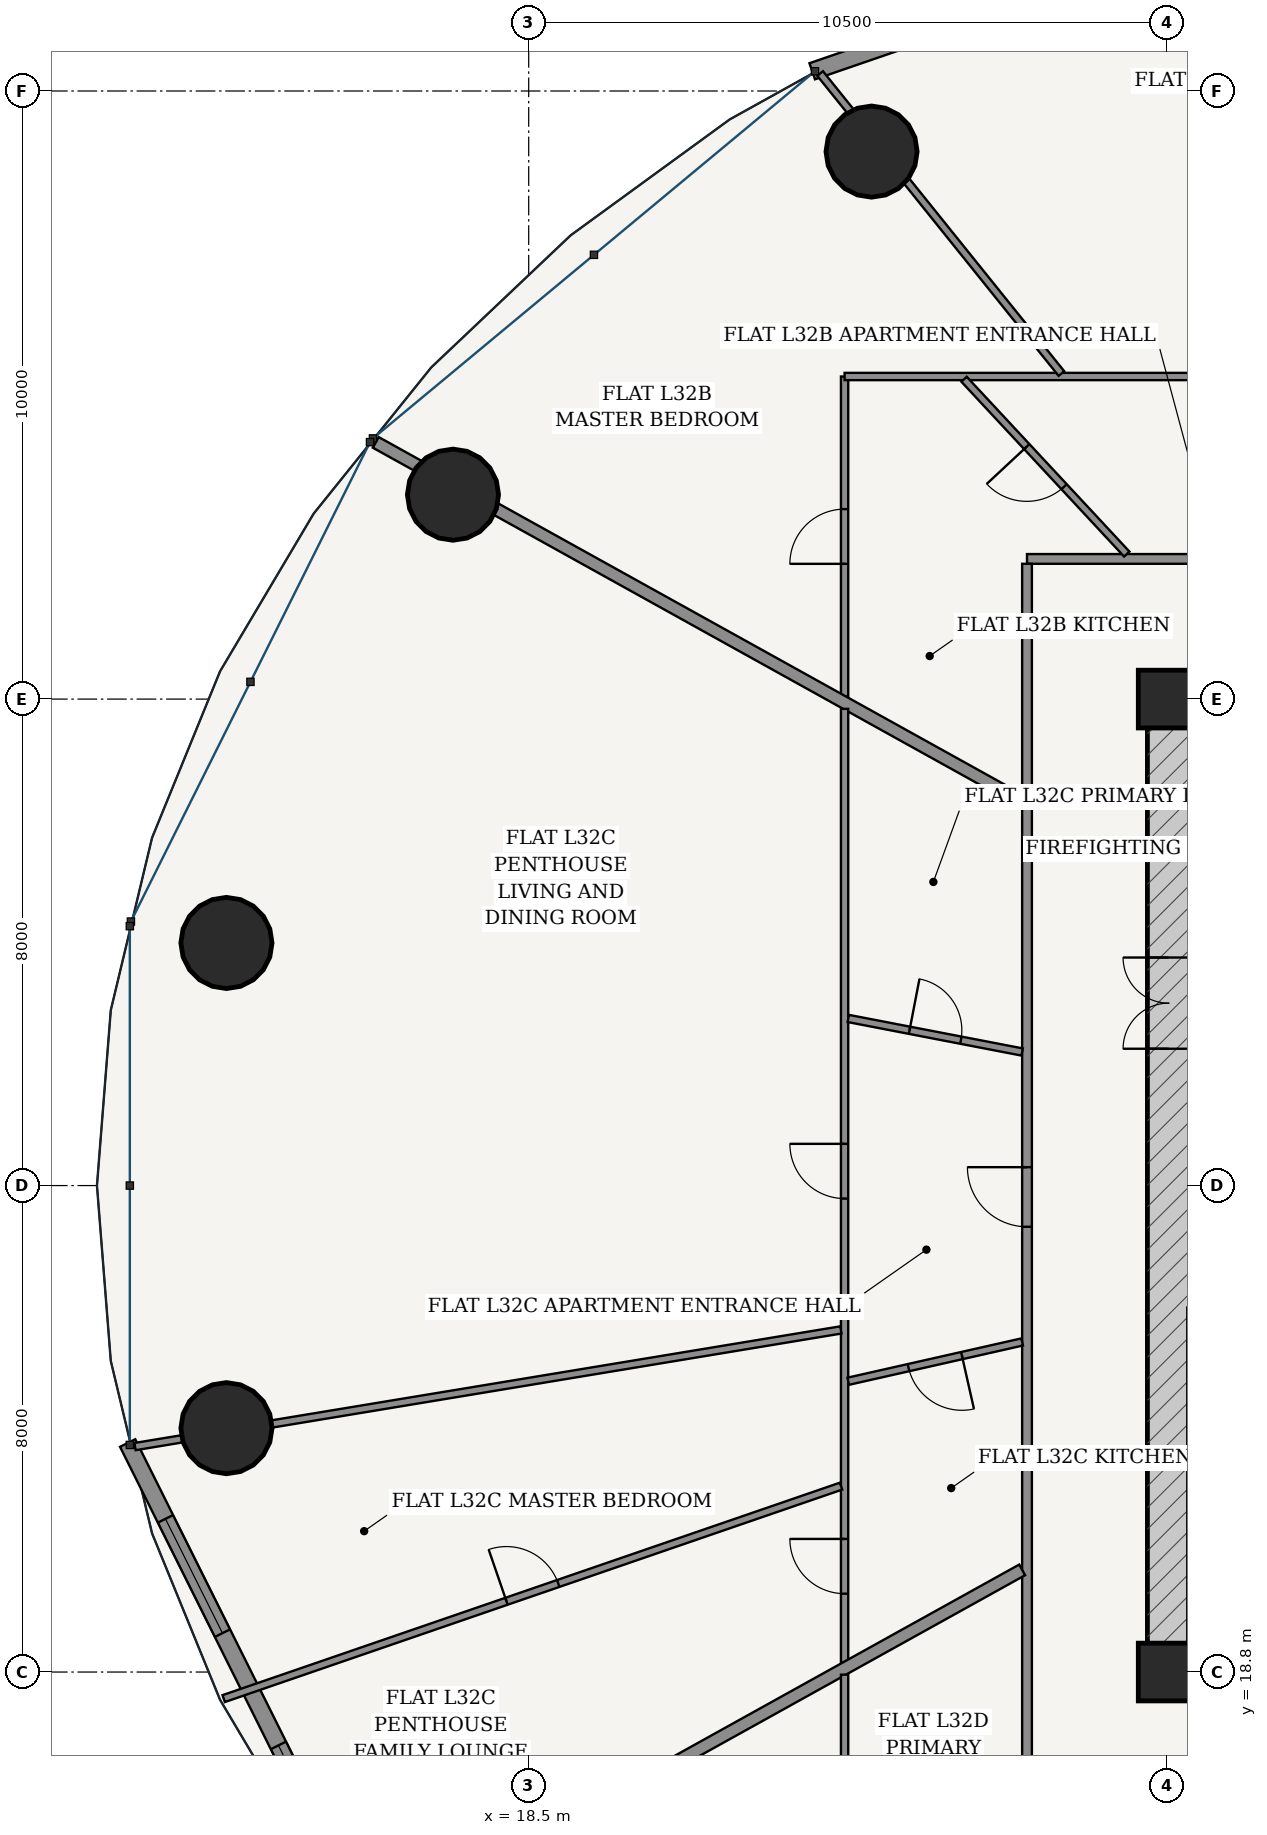
"""IFC4 building model, lengths in metres.
Left out: names, types, materials, properties, quantities, classifications, styles, units other than length and angle.
Written with IfcOpenShell. Run it as: python <this file> out.ifc"""

import sys

from ifc_helpers import new_model, si_unit, direction, frame, frame_2d, origin, origin_2d, place, context, subcontext, project, spatial, rectangle, hollow_circle, extrude, source, transform, mapped, element, fill, save


model = new_model("IFC4")
c1 = context("Model", 3, precision=1e-05, world=origin(), true_north=direction((-0.2419218956, 0.970295726276)))
c2 = subcontext(c1, "Body", "Model", "MODEL_VIEW")
j1 = project(units=[si_unit("LENGTHUNIT", "METRE"), si_unit("PLANEANGLEUNIT", "RADIAN")], contexts=[c1])
p1 = place(None, origin())
s1 = spatial("IfcSite", under=j1, at=p1, CompositionType="ELEMENT")
p2 = place(p1, origin())
s2 = spatial("IfcBuilding", under=s1, at=p2, CompositionType="ELEMENT")
p3 = place(p2, frame((0.0, 0.0, 123.0)))
s3 = spatial("IfcBuildingStorey", under=s2, at=p3, CompositionType="ELEMENT", Elevation=123.0)
for number, where, z_axis, x_axis in (
    (1, (29.0, 18.8, 0.0), (0.0, 0.0, 1.0), (1.0, 0.0, 0.0)),
    (2, (29.0, 34.8, 0.0), (0.0, 0.0, 1.0), (1.0, 0.0, 0.0)),
):
    element("IfcColumn", number, at=place(p3, frame(where, z_axis=z_axis, x_axis=x_axis)), inside=s3, PredefinedType="COLUMN", context=c2, shape_type="SweptSolid", body=[
        extrude(rectangle(XDim=0.95, YDim=0.95, at=origin_2d()), origin(), (0.0, 0.0, 1.0), 3.6),
    ])
p4 = place(p3, frame((28.675, 18.825, 0.0), z_axis=(0.0, 0.0, 1.0), x_axis=(1.0, 0.0, 0.0)))
e3 = element("IfcWall", 3, at=p4, inside=s3, PredefinedType="SHEAR", context=c2, shape_type="SweptSolid", body=[
    extrude(rectangle(XDim=18.65, YDim=0.7, at=frame_2d((9.325, 0.0))), origin(), (0.0, 0.0, 1.0), 3.325),
])
p5 = place(p4, frame((8.9, 0.0, 0.0)))
e4 = element("IfcOpeningElement", 4, at=p5, cuts=e3, PredefinedType="OPENING", context=c2, shape_type="SweptSolid", body=[
    extrude(rectangle(XDim=0.85, YDim=2.1, at=frame_2d((0.425, 1.05))), frame((0.0, 0.36, 0.0), z_axis=(0.0, -1.0, 0.0), x_axis=(1.0, 0.0, 0.0)), (0.0, 0.0, 1.0), 0.72),
])
p6 = place(p3, frame((28.675, 34.775, 0.0), z_axis=(0.0, 0.0, 1.0), x_axis=(1.0, 0.0, 0.0)))
e5 = element("IfcWall", 5, at=p6, inside=s3, PredefinedType="SHEAR", context=c2, shape_type="SweptSolid", body=[
    extrude(rectangle(XDim=18.65, YDim=0.7, at=frame_2d((9.325, 0.0))), origin(), (0.0, 0.0, 1.0), 3.325),
])
p7 = place(p6, frame((8.9, 0.0, 0.0)))
e6 = element("IfcOpeningElement", 6, at=p7, cuts=e5, PredefinedType="OPENING", context=c2, shape_type="SweptSolid", body=[
    extrude(rectangle(XDim=0.85, YDim=2.1, at=frame_2d((0.425, 1.05))), frame((0.0, 0.36, 0.0), z_axis=(0.0, -1.0, 0.0), x_axis=(1.0, 0.0, 0.0)), (0.0, 0.0, 1.0), 0.72),
])
p8 = place(p3, frame((29.025, 19.175, 0.0), z_axis=(0.0, 0.0, 1.0), x_axis=(0.0, 1.0, 0.0)))
e7 = element("IfcWall", 7, at=p8, inside=s3, PredefinedType="SHEAR", context=c2, shape_type="SweptSolid", body=[
    extrude(rectangle(XDim=15.25, YDim=0.7, at=frame_2d((7.625, 0.0))), origin(), (0.0, 0.0, 1.0), 3.325),
])
p9 = place(p8, frame((9.875, 0.0, 0.0)))
e8 = element("IfcOpeningElement", 8, at=p9, cuts=e7, PredefinedType="OPENING", context=c2, shape_type="SweptSolid", body=[
    extrude(rectangle(XDim=1.5, YDim=2.2, at=frame_2d((0.75, 1.1))), frame((0.0, 0.36, 0.0), z_axis=(0.0, -1.0, 0.0), x_axis=(1.0, 0.0, 0.0)), (0.0, 0.0, 1.0), 0.72),
])
for number, where, z_axis, x_axis in (
    (9, (24.138, 43.803, 0.0), (0.0, 0.0, 1.0), (1.0, 0.0, 0.0)),
    (10, (17.255, 38.161, 0.0), (0.0, 0.0, 1.0), (1.0, 0.0, 0.0)),
    (11, (13.529, 30.79, 0.0), (0.0, 0.0, 1.0), (1.0, 0.0, 0.0)),
    (12, (13.529, 22.81, 0.0), (0.0, 0.0, 1.0), (1.0, 0.0, 0.0)),
):
    element("IfcColumn", number, at=place(p3, frame(where, z_axis=z_axis, x_axis=x_axis)), inside=s3, PredefinedType="COLUMN", context=c2, shape_type="SweptSolid", body=[
        extrude(hollow_circle(Radius=0.75, WallThickness=0.045, at=origin_2d()), origin(), (0.0, 0.0, 1.0), 3.6),
    ])
p10 = place(p3, frame((32.892, 48.472, 0.0), z_axis=(0.0, 0.0, 1.0), x_axis=(-0.945597432299, -0.325339047809, 0.0)))
e13 = element("IfcWall", 13, at=p10, inside=s3, PredefinedType="SOLIDWALL", context=c2, shape_type="SweptSolid", body=[
    extrude(rectangle(XDim=10.289, YDim=0.28, at=frame_2d((5.145, 0.0))), origin(), (0.0, 0.0, 1.0), 3.325),
])
p11 = place(p10, frame((1.728, 0.0, 0.85)))
e14 = element("IfcOpeningElement", 14, at=p11, cuts=e13, PredefinedType="OPENING", context=c2, shape_type="SweptSolid", body=[
    extrude(rectangle(XDim=2.1, YDim=1.95, at=frame_2d((1.05, 0.975))), frame((0.0, 0.15, 0.0), z_axis=(0.0, -1.0, 0.0), x_axis=(1.0, 0.0, 0.0)), (0.0, 0.0, 1.0), 0.3),
])
p12 = place(p10, frame((6.461, 0.0, 0.85)))
e15 = element("IfcOpeningElement", 15, at=p12, cuts=e13, PredefinedType="OPENING", context=c2, shape_type="SweptSolid", body=[
    extrude(rectangle(XDim=2.1, YDim=1.95, at=frame_2d((1.05, 0.975))), frame((0.0, 0.15, 0.0), z_axis=(0.0, -1.0, 0.0), x_axis=(1.0, 0.0, 0.0)), (0.0, 0.0, 1.0), 0.3),
])
p13 = place(p3, frame((11.905, 22.566, 0.0), z_axis=(0.0, 0.0, 1.0), x_axis=(0.446274562077, -0.894896091869, 0.0)))
e16 = element("IfcWall", 16, at=p13, inside=s3, PredefinedType="SOLIDWALL", context=c2, shape_type="SweptSolid", body=[
    extrude(rectangle(XDim=9.05, YDim=0.28, at=frame_2d((4.525, 0.0))), origin(), (0.0, 0.0, 1.0), 3.325),
])
p14 = place(p13, frame((1.394, 0.0, 0.85)))
e17 = element("IfcOpeningElement", 17, at=p14, cuts=e16, PredefinedType="OPENING", context=c2, shape_type="SweptSolid", body=[
    extrude(rectangle(XDim=2.1, YDim=1.95, at=frame_2d((1.05, 0.975))), frame((0.0, 0.15, 0.0), z_axis=(0.0, -1.0, 0.0), x_axis=(1.0, 0.0, 0.0)), (0.0, 0.0, 1.0), 0.3),
])
p15 = place(p13, frame((5.557, 0.0, 0.85)))
e18 = element("IfcOpeningElement", 18, at=p15, cuts=e16, PredefinedType="OPENING", context=c2, shape_type="SweptSolid", body=[
    extrude(rectangle(XDim=2.1, YDim=1.95, at=frame_2d((1.05, 0.975))), frame((0.0, 0.15, 0.0), z_axis=(0.0, -1.0, 0.0), x_axis=(1.0, 0.0, 0.0)), (0.0, 0.0, 1.0), 0.3),
])
p16 = place(p3, frame((26.695, 37.105, 0.0), z_axis=(0.0, 0.0, 1.0), x_axis=(1.0, 0.0, 0.0)))
e19 = element("IfcWall", 19, at=p16, inside=s3, PredefinedType="PARTITIONING", context=c2, shape_type="SweptSolid", body=[
    extrude(rectangle(XDim=22.61, YDim=0.16, at=frame_2d((11.305, 0.0))), origin(), (0.0, 0.0, 1.0), 2.767),
])
p17 = place(p16, frame((4.925, 0.0, 0.0)))
e20 = element("IfcOpeningElement", 20, at=p17, cuts=e19, PredefinedType="OPENING", context=c2, shape_type="SweptSolid", body=[
    extrude(rectangle(XDim=0.98, YDim=2.2, at=frame_2d((0.49, 1.1))), frame((0.0, 0.09, 0.0), z_axis=(0.0, -1.0, 0.0), x_axis=(1.0, 0.0, 0.0)), (0.0, 0.0, 1.0), 0.18),
])
p18 = place(p3, frame((26.695, 16.575, 0.0), z_axis=(0.0, 0.0, 1.0), x_axis=(0.0, 1.0, 0.0)))
e21 = element("IfcWall", 21, at=p18, inside=s3, PredefinedType="PARTITIONING", context=c2, shape_type="SweptSolid", body=[
    extrude(rectangle(XDim=20.45, YDim=0.16, at=frame_2d((10.225, 0.0))), origin(), (0.0, 0.0, 1.0), 2.767),
])
p19 = place(p18, frame((9.547, 0.0, 0.0)))
e22 = element("IfcOpeningElement", 22, at=p19, cuts=e21, PredefinedType="OPENING", context=c2, shape_type="SweptSolid", body=[
    extrude(rectangle(XDim=0.98, YDim=2.2, at=frame_2d((0.49, 1.1))), frame((0.0, 0.09, 0.0), z_axis=(0.0, -1.0, 0.0), x_axis=(1.0, 0.0, 0.0)), (0.0, 0.0, 1.0), 0.18),
])
p20 = place(p3, frame((23.695, 34.843, 0.0), z_axis=(0.0, 0.0, 1.0), x_axis=(0.0, 1.0, 0.0)))
e23 = element("IfcWall", 23, at=p20, inside=s3, PredefinedType="PARTITIONING", context=c2, shape_type="SweptSolid", body=[
    extrude(rectangle(XDim=5.262, YDim=0.12, at=frame_2d((2.631, 0.0))), origin(), (0.0, 0.0, 1.0), 3.004),
])
p21 = place(p20, frame((2.181, 0.0, 0.0)))
e24 = element("IfcOpeningElement", 24, at=p21, cuts=e23, PredefinedType="OPENING", context=c2, shape_type="SweptSolid", body=[
    extrude(rectangle(XDim=0.9, YDim=2.15, at=frame_2d((0.45, 1.075))), frame((0.0, 0.07, 0.0), z_axis=(0.0, -1.0, 0.0), x_axis=(1.0, 0.0, 0.0)), (0.0, 0.0, 1.0), 0.14),
])
p22 = place(p3, frame((23.695, 40.105, 0.0), z_axis=(0.0, 0.0, 1.0), x_axis=(1.0, 0.0, 0.0)))
e25 = element("IfcWall", 25, at=p22, inside=s3, PredefinedType="PARTITIONING", context=c2, shape_type="SweptSolid", body=[
    extrude(rectangle(XDim=17.388, YDim=0.12, at=frame_2d((8.694, 0.0))), origin(), (0.0, 0.0, 1.0), 2.767),
])
p23 = place(p22, frame((7.184, 0.0, 0.0)))
e26 = element("IfcOpeningElement", 26, at=p23, cuts=e25, PredefinedType="OPENING", context=c2, shape_type="SweptSolid", body=[
    extrude(rectangle(XDim=0.9, YDim=2.15, at=frame_2d((0.45, 1.075))), frame((0.0, 0.07, 0.0), z_axis=(0.0, -1.0, 0.0), x_axis=(1.0, 0.0, 0.0)), (0.0, 0.0, 1.0), 0.14),
])
p24 = place(p3, frame((27.261, 40.153, 0.0), z_axis=(0.0, 0.0, 1.0), x_axis=(-0.626714875168, 0.779248654309, 0.0)))
e27 = element("IfcWall", 27, at=p24, inside=s3, PredefinedType="PARTITIONING", context=c2, shape_type="SweptSolid", body=[
    extrude(rectangle(XDim=6.332, YDim=0.12, at=frame_2d((3.166, 0.0))), origin(), (0.0, 0.0, 1.0), 2.767),
])
p25 = place(p3, frame((28.335, 37.185, 0.0), z_axis=(0.0, 0.0, 1.0), x_axis=(-0.681251984121, 0.732048997083, 0.0)))
e28 = element("IfcWall", 28, at=p25, inside=s3, PredefinedType="PARTITIONING", context=c2, shape_type="SweptSolid", body=[
    extrude(rectangle(XDim=3.927, YDim=0.12, at=frame_2d((1.963, 0.0))), origin(), (0.0, 0.0, 1.0), 2.767),
])
p26 = place(p25, frame((1.513, 0.0, 0.0)))
e29 = element("IfcOpeningElement", 29, at=p26, cuts=e28, PredefinedType="OPENING", context=c2, shape_type="SweptSolid", body=[
    extrude(rectangle(XDim=0.9, YDim=2.15, at=frame_2d((0.45, 1.075))), frame((0.0, 0.07, 0.0), z_axis=(0.0, -1.0, 0.0), x_axis=(1.0, 0.0, 0.0)), (0.0, 0.0, 1.0), 0.14),
])
p27 = place(p3, frame((26.615, 33.12, 0.0), z_axis=(0.0, 0.0, 1.0), x_axis=(-0.874319192772, 0.485351366692, 0.0)))
e30 = element("IfcWall", 30, at=p27, inside=s3, PredefinedType="PARTITIONING", context=c2, shape_type="SweptSolid", body=[
    extrude(rectangle(XDim=12.158, YDim=0.2, at=frame_2d((6.079, 0.0))), origin(), (0.0, 0.0, 1.0), 2.767),
])
p28 = place(p3, frame((23.695, 18.961, 0.0), z_axis=(0.0, 0.0, 1.0), x_axis=(0.0, 1.0, 0.0)))
e31 = element("IfcWall", 31, at=p28, inside=s3, PredefinedType="PARTITIONING", context=c2, shape_type="SweptSolid", body=[
    extrude(rectangle(XDim=15.679, YDim=0.12, at=frame_2d((7.839, 0.0))), origin(), (0.0, 0.0, 1.0), 2.767),
])
p29 = place(p28, frame((7.625, 0.0, 0.0)))
e32 = element("IfcOpeningElement", 32, at=p29, cuts=e31, PredefinedType="OPENING", context=c2, shape_type="SweptSolid", body=[
    extrude(rectangle(XDim=0.9, YDim=2.15, at=frame_2d((0.45, 1.075))), frame((0.0, 0.07, 0.0), z_axis=(0.0, -1.0, 0.0), x_axis=(1.0, 0.0, 0.0)), (0.0, 0.0, 1.0), 0.14),
])
p30 = place(p28, frame((1.128, 0.0, 0.0)))
e33 = element("IfcOpeningElement", 33, at=p30, cuts=e31, PredefinedType="OPENING", context=c2, shape_type="SweptSolid", body=[
    extrude(rectangle(XDim=0.9, YDim=2.15, at=frame_2d((0.45, 1.075))), frame((0.0, 0.07, 0.0), z_axis=(0.0, -1.0, 0.0), x_axis=(1.0, 0.0, 0.0)), (0.0, 0.0, 1.0), 0.14),
])
p31 = place(p3, frame((23.634, 24.426, 0.0), z_axis=(0.0, 0.0, 1.0), x_axis=(-0.986619012175, -0.163042708564, 0.0)))
e34 = element("IfcWall", 34, at=p31, inside=s3, PredefinedType="PARTITIONING", context=c2, shape_type="SweptSolid", body=[
    extrude(rectangle(XDim=11.765, YDim=0.12, at=frame_2d((5.883, 0.0))), origin(), (0.0, 0.0, 1.0), 2.767),
])
p32 = place(p3, frame((23.636, 21.857, 0.0), z_axis=(0.0, 0.0, 1.0), x_axis=(-0.945571197348, -0.325415289661, 0.0)))
e35 = element("IfcWall", 35, at=p32, inside=s3, PredefinedType="PARTITIONING", context=c2, shape_type="SweptSolid", body=[
    extrude(rectangle(XDim=10.737, YDim=0.12, at=frame_2d((5.368, 0.0))), origin(), (0.0, 0.0, 1.0), 2.767),
])
p33 = place(p32, frame((4.918, 0.0, 0.0)))
e36 = element("IfcOpeningElement", 36, at=p33, cuts=e35, PredefinedType="OPENING", context=c2, shape_type="SweptSolid", body=[
    extrude(rectangle(XDim=0.9, YDim=2.15, at=frame_2d((0.45, 1.075))), frame((0.0, 0.07, 0.0), z_axis=(0.0, -1.0, 0.0), x_axis=(1.0, 0.0, 0.0)), (0.0, 0.0, 1.0), 0.14),
])
p34 = place(p3, frame((26.615, 28.996, 0.0), z_axis=(0.0, 0.0, 1.0), x_axis=(-0.98189924136, 0.189404012145, 0.0)))
e37 = element("IfcWall", 37, at=p34, inside=s3, PredefinedType="PARTITIONING", context=c2, shape_type="SweptSolid", body=[
    extrude(rectangle(XDim=2.912, YDim=0.12, at=frame_2d((1.456, 0.0))), origin(), (0.0, 0.0, 1.0), 3.325),
])
p35 = place(p34, frame((1.026, 0.0, 0.0)))
e38 = element("IfcOpeningElement", 38, at=p35, cuts=e37, PredefinedType="OPENING", context=c2, shape_type="SweptSolid", body=[
    extrude(rectangle(XDim=0.86, YDim=2.15, at=frame_2d((0.43, 1.075))), frame((0.0, 0.07, 0.0), z_axis=(0.0, -1.0, 0.0), x_axis=(1.0, 0.0, 0.0)), (0.0, 0.0, 1.0), 0.14),
])
p36 = place(p3, frame((26.615, 24.228, 0.0), z_axis=(0.0, 0.0, 1.0), x_axis=(-0.975420797165, -0.220350331196, 0.0)))
e39 = element("IfcWall", 39, at=p36, inside=s3, PredefinedType="PARTITIONING", context=c2, shape_type="SweptSolid", body=[
    extrude(rectangle(XDim=2.932, YDim=0.12, at=frame_2d((1.466, 0.0))), origin(), (0.0, 0.0, 1.0), 3.325),
])
p37 = place(p36, frame((1.016, 0.0, 0.0)))
e40 = element("IfcOpeningElement", 40, at=p37, cuts=e39, PredefinedType="OPENING", context=c2, shape_type="SweptSolid", body=[
    extrude(rectangle(XDim=0.9, YDim=2.15, at=frame_2d((0.45, 1.075))), frame((0.0, 0.07, 0.0), z_axis=(0.0, -1.0, 0.0), x_axis=(1.0, 0.0, 0.0)), (0.0, 0.0, 1.0), 0.14),
])
p38 = place(p3, frame((26.615, 20.48, 0.0), z_axis=(0.0, 0.0, 1.0), x_axis=(-0.874310671773, -0.48536671623, 0.0)))
e41 = element("IfcWall", 41, at=p38, inside=s3, PredefinedType="PARTITIONING", context=c2, shape_type="SweptSolid", body=[
    extrude(rectangle(XDim=12.159, YDim=0.2, at=frame_2d((6.079, 0.0))), origin(), (0.0, 0.0, 1.0), 2.767),
])
p39 = place(p3, frame((23.695, 13.495, 0.0), z_axis=(0.0, 0.0, 1.0), x_axis=(0.0, 1.0, 0.0)))
e42 = element("IfcWall", 42, at=p39, inside=s3, PredefinedType="PARTITIONING", context=c2, shape_type="SweptSolid", body=[
    extrude(rectangle(XDim=5.261, YDim=0.12, at=frame_2d((2.631, 0.0))), origin(), (0.0, 0.0, 1.0), 3.004),
])
m1 = source(origin(), c2, "Body", "SweptSolid", [
    extrude(rectangle(XDim=2.1, YDim=1.95, at=frame_2d((1.05, 0.975))), frame((0.0, 0.03, 0.0), z_axis=(0.0, -1.0, 0.0), x_axis=(1.0, 0.0, 0.0)), (0.0, 0.0, 1.0), 0.06),
])
p40 = place(p14, origin())
e43 = element("IfcWindow", 43, at=p40, inside=s3, PartitioningType="SINGLE_PANEL", PredefinedType="WINDOW", context=c2, shape_type="MappedRepresentation", body=[
    mapped(m1, transform((0.0, 0.0, 0.0), scale=1.0)),
])
fill(e17, e43)
p41 = place(p15, origin())
e44 = element("IfcWindow", 44, at=p41, inside=s3, PartitioningType="SINGLE_PANEL", PredefinedType="WINDOW", context=c2, shape_type="MappedRepresentation", body=[
    mapped(m1, transform((0.0, 0.0, 0.0), scale=1.0)),
])
fill(e18, e44)
m2 = source(origin(), c2, "Body", "SweptSolid", [
    extrude(rectangle(XDim=1.5, YDim=2.2, at=frame_2d((0.75, 1.1))), frame((0.0, 0.025, 0.0), z_axis=(0.0, -1.0, 0.0), x_axis=(1.0, 0.0, 0.0)), (0.0, 0.0, 1.0), 0.05),
])
p42 = place(p9, origin())
e45 = element("IfcDoor", 45, at=p42, inside=s3, OperationType="DOUBLE_DOOR_SINGLE_SWING", PredefinedType="DOOR", context=c2, shape_type="MappedRepresentation", body=[
    mapped(m2, transform((0.0, 0.0, 0.0), scale=1.0)),
])
fill(e8, e45)
m3 = source(origin(), c2, "Body", "SweptSolid", [
    extrude(rectangle(XDim=0.9, YDim=2.15, at=frame_2d((0.45, 1.075))), frame((0.0, 0.025, 0.0), z_axis=(0.0, -1.0, 0.0), x_axis=(1.0, 0.0, 0.0)), (0.0, 0.0, 1.0), 0.05),
])
p43 = place(p26, origin())
e46 = element("IfcDoor", 46, at=p43, inside=s3, OperationType="SINGLE_SWING_RIGHT", PredefinedType="DOOR", context=c2, shape_type="MappedRepresentation", body=[
    mapped(m3, transform((0.0, 0.0, 0.0), scale=1.0)),
])
fill(e29, e46)
p44 = place(p21, origin())
e47 = element("IfcDoor", 47, at=p44, inside=s3, OperationType="SINGLE_SWING_LEFT", PredefinedType="DOOR", context=c2, shape_type="MappedRepresentation", body=[
    mapped(m3, transform((0.0, 0.0, 0.0), scale=1.0)),
])
fill(e24, e47)
m4 = source(origin(), c2, "Body", "SweptSolid", [
    extrude(rectangle(XDim=0.98, YDim=2.2, at=frame_2d((0.49, 1.1))), frame((0.0, 0.025, 0.0), z_axis=(0.0, -1.0, 0.0), x_axis=(1.0, 0.0, 0.0)), (0.0, 0.0, 1.0), 0.05),
])
p45 = place(p19, origin())
e48 = element("IfcDoor", 48, at=p45, inside=s3, OperationType="SINGLE_SWING_RIGHT", PredefinedType="DOOR", context=c2, shape_type="MappedRepresentation", body=[
    mapped(m4, transform((0.0, 0.0, 0.0), scale=1.0)),
])
fill(e22, e48)
m5 = source(origin(), c2, "Body", "SweptSolid", [
    extrude(rectangle(XDim=0.86, YDim=2.15, at=frame_2d((0.43, 1.075))), frame((0.0, 0.025, 0.0), z_axis=(0.0, -1.0, 0.0), x_axis=(1.0, 0.0, 0.0)), (0.0, 0.0, 1.0), 0.05),
])
p46 = place(p35, frame((0.86, 0.0, 0.0), z_axis=(0.0, 0.0, 1.0), x_axis=(-1.0, 0.0, 0.0)))
e49 = element("IfcDoor", 49, at=p46, inside=s3, OperationType="SINGLE_SWING_LEFT", PredefinedType="DOOR", context=c2, shape_type="MappedRepresentation", body=[
    mapped(m5, transform((0.0, 0.0, 0.0), scale=1.0)),
])
fill(e38, e49)
p47 = place(p29, origin())
e50 = element("IfcDoor", 50, at=p47, inside=s3, OperationType="SINGLE_SWING_RIGHT", PredefinedType="DOOR", context=c2, shape_type="MappedRepresentation", body=[
    mapped(m3, transform((0.0, 0.0, 0.0), scale=1.0)),
])
fill(e32, e50)
p48 = place(p37, origin())
e51 = element("IfcDoor", 51, at=p48, inside=s3, OperationType="SINGLE_SWING_LEFT", PredefinedType="DOOR", context=c2, shape_type="MappedRepresentation", body=[
    mapped(m3, transform((0.0, 0.0, 0.0), scale=1.0)),
])
fill(e40, e51)
p49 = place(p30, origin())
e52 = element("IfcDoor", 52, at=p49, inside=s3, OperationType="SINGLE_SWING_RIGHT", PredefinedType="DOOR", context=c2, shape_type="MappedRepresentation", body=[
    mapped(m3, transform((0.0, 0.0, 0.0), scale=1.0)),
])
fill(e33, e52)
p50 = place(p33, frame((0.9, 0.0, 0.0), z_axis=(0.0, 0.0, 1.0), x_axis=(-1.0, 0.0, 0.0)))
e53 = element("IfcDoor", 53, at=p50, inside=s3, OperationType="SINGLE_SWING_LEFT", PredefinedType="DOOR", context=c2, shape_type="MappedRepresentation", body=[
    mapped(m3, transform((0.0, 0.0, 0.0), scale=1.0)),
])
fill(e36, e53)
save(model, sys.argv[1])
